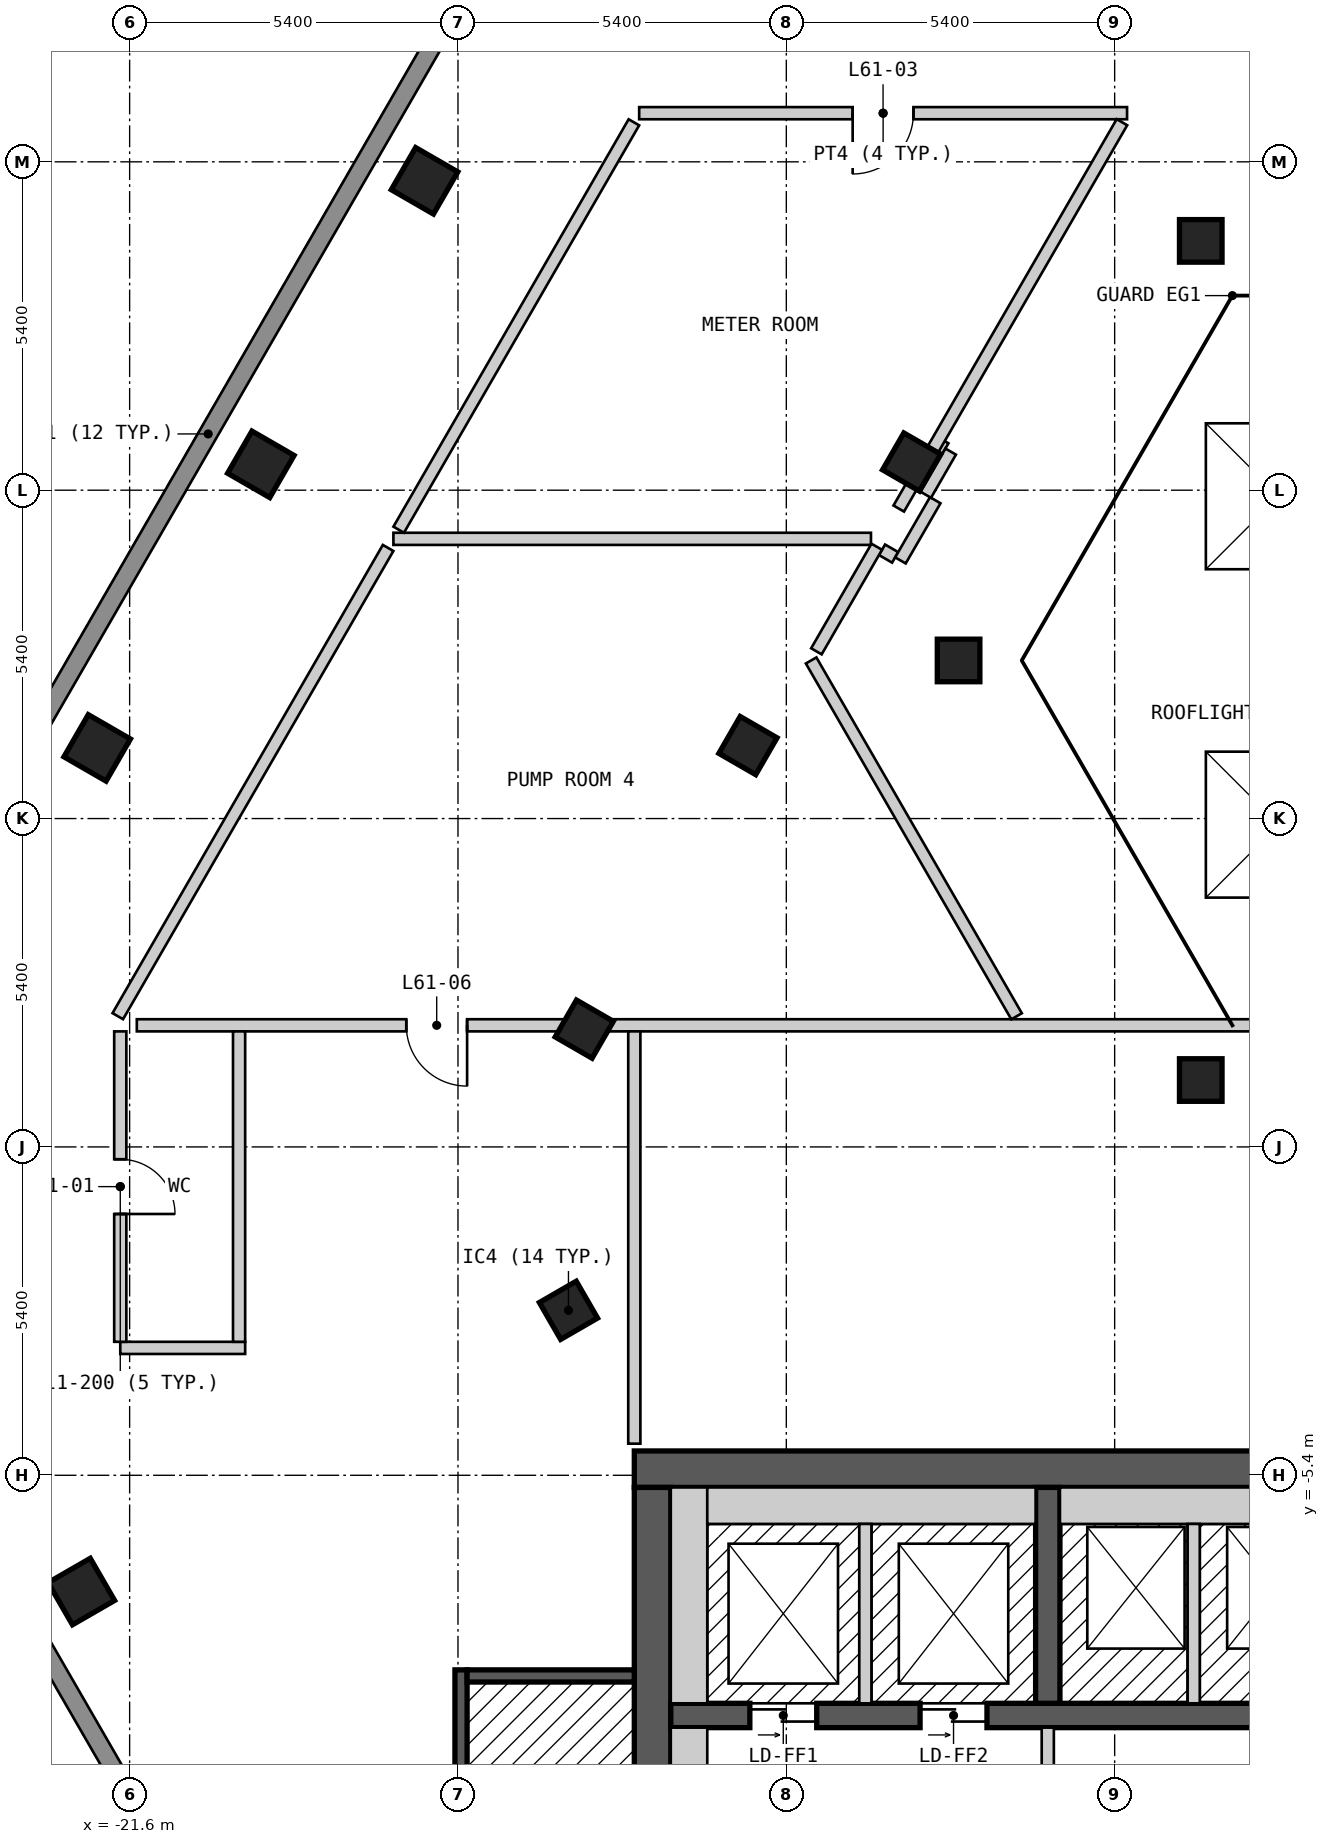
"""IFC4 building model, lengths in metres.
Left out: names, types, materials, properties, quantities, classifications, styles, units other than length and angle.
Written with IfcOpenShell. Run it as: python <this file> out.ifc"""

import sys

from ifc_helpers import new_model, si_unit, direction, frame, frame_2d, origin, origin_2d, place, context, subcontext, project, spatial, polyline, rectangle, outline, extrude, element, fill, save


model = new_model("IFC4")
c1 = context("Model", 3, precision=1e-05, world=origin(), true_north=direction((0.0, 1.0)))
c2 = subcontext(c1, "Body", "Model", "MODEL_VIEW")
j1 = project(units=[si_unit("LENGTHUNIT", "METRE"), si_unit("PLANEANGLEUNIT", "RADIAN")], contexts=[c1])
p1 = place(None, origin())
s1 = spatial("IfcSite", under=j1, at=p1, CompositionType="ELEMENT")
p2 = place(p1, origin())
s2 = spatial("IfcBuilding", under=s1, at=p2, CompositionType="ELEMENT")
p3 = place(p2, frame((0.0, 0.0, 199.2)))
s3 = spatial("IfcBuildingStorey", under=s2, at=p3, CompositionType="ELEMENT", Elevation=199.2)
for number, where, z_axis, x_axis in (
    (1, (-16.75, 15.888, 0.0), (0.0, 0.0, 1.0), (-0.5, -0.866, 0.0)),
    (2, (-19.442, 11.225, 0.0), (0.0, 0.0, 1.0), (-0.5, -0.866, 0.0)),
    (3, (-22.134, 6.562, 0.0), (0.0, 0.0, 1.0), (-0.5, -0.866, 0.0)),
    (4, (-22.394, -7.312, 0.0), (0.0, 0.0, 1.0), (0.5, -0.866, 0.0)),
):
    element("IfcColumn", number, at=place(p3, frame(where, z_axis=z_axis, x_axis=x_axis)), inside=s3, PredefinedType="COLUMN", context=c2, shape_type="SweptSolid", body=[
        extrude(rectangle(XDim=0.8, YDim=0.8, at=origin_2d()), origin(), (0.0, 0.0, 1.0), 3.6),
    ])
for number, where, z_axis, x_axis in (
    (5, (-14.383, -2.687, 0.0), (0.0, 0.0, 1.0), (0.5, -0.866, 0.0)),
    (6, (-3.984, 14.9, 0.0), (0.0, 0.0, 1.0), (1.0, 0.0, 0.0)),
    (7, (-8.739, 11.263, 0.0), (0.0, 0.0, 1.0), (-0.5, -0.866, 0.0)),
    (8, (-7.967, 8.0, 0.0), (0.0, 0.0, 1.0), (1.0, 0.0, 0.0)),
    (9, (-11.431, 6.6, 0.0), (0.0, 0.0, 1.0), (-0.5, -0.866, 0.0)),
    (10, (-3.984, 1.1, 0.0), (0.0, 0.0, 1.0), (1.0, 0.0, 0.0)),
    (11, (-14.123, 1.937, 0.0), (0.0, 0.0, 1.0), (-0.5, -0.866, 0.0)),
):
    element("IfcColumn", number, at=place(p3, frame(where, z_axis=z_axis, x_axis=x_axis)), inside=s3, PredefinedType="COLUMN", context=c2, shape_type="SweptSolid", body=[
        extrude(rectangle(XDim=0.7, YDim=0.7, at=origin_2d()), origin(), (0.0, 0.0, 1.0), 3.6),
    ])
p4 = place(p3, frame((-13.3, -5.3, 0.0), z_axis=(0.0, 0.0, 1.0), x_axis=(1.0, 0.0, 0.0)))
e12 = element("IfcWall", 12, at=p4, inside=s3, PredefinedType="SHEAR", context=c2, shape_type="SweptSolid", body=[
    extrude(rectangle(XDim=26.6, YDim=0.6, at=frame_2d((13.3, 0.0))), origin(), (0.0, 0.0, 1.0), 2.6),
])
p5 = place(p4, frame((23.65, 0.0, 0.0)))
e13 = element("IfcOpeningElement", 13, at=p5, cuts=e12, PredefinedType="OPENING", context=c2, shape_type="SweptSolid", body=[
    extrude(rectangle(XDim=1.2, YDim=2.1, at=frame_2d((0.6, 1.05))), frame((0.0, 0.31, 0.0), z_axis=(0.0, -1.0, 0.0), x_axis=(1.0, 0.0, 0.0)), (0.0, 0.0, 1.0), 0.62),
])
p6 = place(p3, frame((-13.0, -18.4, 0.0), z_axis=(0.0, 0.0, 1.0), x_axis=(0.0, 1.0, 0.0)))
e14 = element("IfcWall", 14, at=p6, inside=s3, PredefinedType="SHEAR", context=c2, shape_type="SweptSolid", body=[
    extrude(rectangle(XDim=12.8, YDim=0.6, at=frame_2d((6.4, 0.0))), origin(), (0.0, 0.0, 1.0), 2.6),
])
p7 = place(p6, frame((4.2, 0.0, 0.0)))
e15 = element("IfcOpeningElement", 15, at=p7, cuts=e14, PredefinedType="OPENING", context=c2, shape_type="SweptSolid", body=[
    extrude(rectangle(XDim=1.2, YDim=2.1, at=frame_2d((0.6, 1.05))), frame((0.0, 0.31, 0.0), z_axis=(0.0, -1.0, 0.0), x_axis=(1.0, 0.0, 0.0)), (0.0, 0.0, 1.0), 0.62),
])
p8 = place(p3, frame((-12.7, -9.35, 0.0), z_axis=(0.0, 0.0, 1.0), x_axis=(1.0, 0.0, 0.0)))
e16 = element("IfcWall", 16, at=p8, inside=s3, PredefinedType="SHEAR", context=c2, shape_type="SweptSolid", body=[
    extrude(rectangle(XDim=22.9, YDim=0.4, at=frame_2d((11.45, 0.0))), origin(), (0.0, 0.0, 1.0), 2.6),
])
p9 = place(p8, frame((1.3, 0.0, 0.0)))
e17 = element("IfcOpeningElement", 17, at=p9, cuts=e16, PredefinedType="OPENING", context=c2, shape_type="SweptSolid", body=[
    extrude(rectangle(XDim=1.1, YDim=2.1, at=frame_2d((0.55, 1.05))), frame((0.0, 0.21, 0.0), z_axis=(0.0, -1.0, 0.0), x_axis=(1.0, 0.0, 0.0)), (0.0, 0.0, 1.0), 0.42),
])
p10 = place(p8, frame((4.1, 0.0, 0.0)))
e18 = element("IfcOpeningElement", 18, at=p10, cuts=e16, PredefinedType="OPENING", context=c2, shape_type="SweptSolid", body=[
    extrude(rectangle(XDim=1.1, YDim=2.1, at=frame_2d((0.55, 1.05))), frame((0.0, 0.21, 0.0), z_axis=(0.0, -1.0, 0.0), x_axis=(1.0, 0.0, 0.0)), (0.0, 0.0, 1.0), 0.42),
])
p11 = place(p8, frame((20.8, 0.0, 0.0)))
e19 = element("IfcOpeningElement", 19, at=p11, cuts=e16, PredefinedType="OPENING", context=c2, shape_type="SweptSolid", body=[
    extrude(rectangle(XDim=1.1, YDim=2.1, at=frame_2d((0.55, 1.05))), frame((0.0, 0.21, 0.0), z_axis=(0.0, -1.0, 0.0), x_axis=(1.0, 0.0, 0.0)), (0.0, 0.0, 1.0), 0.42),
])
p12 = place(p3, frame((-6.5, -9.15, 0.0), z_axis=(0.0, 0.0, 1.0), x_axis=(0.0, 1.0, 0.0)))
e20 = element("IfcWall", 20, at=p12, inside=s3, PredefinedType="SHEAR", context=c2, shape_type="SweptSolid", body=[
    extrude(rectangle(XDim=3.55, YDim=0.4, at=frame_2d((1.775, 0.0))), origin(), (0.0, 0.0, 1.0), 2.6),
])
p13 = place(p3, frame((-14.592, 21.625, 0.0), z_axis=(0.0, 0.0, 1.0), x_axis=(-0.500010537973, -0.866019319597, 0.0)))
e21 = element("IfcWall", 21, at=p13, inside=s3, PredefinedType="SOLIDWALL", context=c2, shape_type="SweptSolid", body=[
    extrude(outline(polyline([(0.0, -0.15), (22.863, -0.15), (22.783, 0.15), (0.08, 0.15), (0.0, -0.15)])), origin(), (0.0, 0.0, 1.0), 2.6),
])
p14 = place(p3, frame((-26.024, -3.025, 0.0), z_axis=(0.0, 0.0, 1.0), x_axis=(0.500018670445, -0.86601462413, 0.0)))
e22 = element("IfcWall", 22, at=p14, inside=s3, PredefinedType="SOLIDWALL", context=c2, shape_type="SweptSolid", body=[
    extrude(outline(polyline([(0.0, -0.15), (20.785, -0.15), (20.705, 0.15), (0.08, 0.15), (0.0, -0.15)])), origin(), (0.0, 0.0, 1.0), 2.6),
])
p15 = place(p3, frame((-21.754, -3.305, 0.0), z_axis=(0.0, 0.0, 1.0), x_axis=(1.0, 0.0, 0.0)))
e23 = element("IfcWall", 23, at=p15, inside=s3, PredefinedType="PARTITIONING", context=c2, shape_type="SweptSolid", body=[
    extrude(rectangle(XDim=2.054, YDim=0.2, at=frame_2d((1.027, 0.0))), origin(), (0.0, 0.0, 1.0), 2.6),
])
p16 = place(p3, frame((-21.482, 2.0, 0.0), z_axis=(0.0, 0.0, 1.0), x_axis=(1.0, 0.0, 0.0)))
e24 = element("IfcWall", 24, at=p16, inside=s3, PredefinedType="SOLIDWALL", context=c2, shape_type="SweptSolid", body=[
    extrude(rectangle(XDim=42.564, YDim=0.2, at=frame_2d((21.282, 0.0))), origin(), (0.0, 0.0, 1.0), 2.6),
])
p17 = place(p16, frame((4.432, 0.0, 0.0)))
e25 = element("IfcOpeningElement", 25, at=p17, cuts=e24, PredefinedType="OPENING", context=c2, shape_type="SweptSolid", body=[
    extrude(rectangle(XDim=1.0, YDim=2.1, at=frame_2d((0.5, 1.05))), frame((0.0, 0.11, 0.0), z_axis=(0.0, -1.0, 0.0), x_axis=(1.0, 0.0, 0.0)), (0.0, 0.0, 1.0), 0.22),
])
p18 = place(p16, frame((25.972, 0.0, 0.0)))
e26 = element("IfcOpeningElement", 26, at=p18, cuts=e24, PredefinedType="OPENING", context=c2, shape_type="SweptSolid", body=[
    extrude(rectangle(XDim=1.8, YDim=2.1, at=frame_2d((0.9, 1.05))), frame((0.0, 0.11, 0.0), z_axis=(0.0, -1.0, 0.0), x_axis=(1.0, 0.0, 0.0)), (0.0, 0.0, 1.0), 0.22),
])
p19 = place(p3, frame((-17.262, 10.0, 0.0), z_axis=(0.0, 0.0, 1.0), x_axis=(1.0, 0.0, 0.0)))
e27 = element("IfcWall", 27, at=p19, inside=s3, PredefinedType="SOLIDWALL", context=c2, shape_type="SweptSolid", body=[
    extrude(rectangle(XDim=7.854, YDim=0.2, at=frame_2d((3.927, 0.0))), origin(), (0.0, 0.0, 1.0), 2.6),
])
p20 = place(p3, frame((-13.22, 17.0, 0.0), z_axis=(0.0, 0.0, 1.0), x_axis=(1.0, 0.0, 0.0)))
e28 = element("IfcWall", 28, at=p20, inside=s3, PredefinedType="PARTITIONING", context=c2, shape_type="SweptSolid", body=[
    extrude(rectangle(XDim=8.024, YDim=0.2, at=frame_2d((4.012, 0.0))), origin(), (0.0, 0.0, 1.0), 2.6),
])
p21 = place(p20, frame((4.511, 0.0, 0.0), z_axis=(0.0, 0.0, 1.0), x_axis=(-1.0, 0.0, 0.0)))
e29 = element("IfcOpeningElement", 29, at=p21, cuts=e28, PredefinedType="OPENING", context=c2, shape_type="SweptSolid", body=[
    extrude(rectangle(XDim=1.0, YDim=2.1, at=frame_2d((0.5, 1.05))), frame((0.0, 0.11, 0.0), z_axis=(0.0, -1.0, 0.0), x_axis=(1.0, 0.0, 0.0)), (0.0, 0.0, 1.0), 0.22),
])
p22 = place(p3, frame((-21.754, -3.205, 0.0), z_axis=(0.0, 0.0, 1.0), x_axis=(0.0, 1.0, 0.0)))
e30 = element("IfcWall", 30, at=p22, inside=s3, PredefinedType="PARTITIONING", context=c2, shape_type="SweptSolid", body=[
    extrude(rectangle(XDim=5.105, YDim=0.2, at=frame_2d((2.552, 0.0))), origin(), (0.0, 0.0, 1.0), 2.6),
])
p23 = place(p22, frame((3.002, 0.0, 0.0), z_axis=(0.0, 0.0, 1.0), x_axis=(-1.0, 0.0, 0.0)))
e31 = element("IfcOpeningElement", 31, at=p23, cuts=e30, PredefinedType="OPENING", context=c2, shape_type="SweptSolid", body=[
    extrude(rectangle(XDim=0.9, YDim=2.1, at=frame_2d((0.45, 1.05))), frame((0.0, 0.11, 0.0), z_axis=(0.0, -1.0, 0.0), x_axis=(1.0, 0.0, 0.0)), (0.0, 0.0, 1.0), 0.22),
])
p24 = place(p3, frame((-19.8, -3.205, 0.0), z_axis=(0.0, 0.0, 1.0), x_axis=(0.0, 1.0, 0.0)))
e32 = element("IfcWall", 32, at=p24, inside=s3, PredefinedType="PARTITIONING", context=c2, shape_type="SweptSolid", body=[
    extrude(rectangle(XDim=5.105, YDim=0.2, at=frame_2d((2.552, 0.0))), origin(), (0.0, 0.0, 1.0), 2.6),
])
p25 = place(p3, frame((-13.3, -4.88, 0.0), z_axis=(0.0, 0.0, 1.0), x_axis=(0.0, 1.0, 0.0)))
e33 = element("IfcWall", 33, at=p25, inside=s3, PredefinedType="PARTITIONING", context=c2, shape_type="SweptSolid", body=[
    extrude(rectangle(XDim=6.78, YDim=0.2, at=frame_2d((3.39, 0.0))), origin(), (0.0, 0.0, 1.0), 2.6),
])
p26 = place(p3, frame((-9.226, 9.82, 0.0), z_axis=(0.0, 0.0, 1.0), x_axis=(0.86558248939, -0.500766366743, 0.0)))
e34 = element("IfcWall", 34, at=p26, inside=s3, PredefinedType="SOLIDWALL", context=c2, shape_type="SweptSolid", body=[
    extrude(rectangle(XDim=0.25, YDim=0.2, at=frame_2d((0.125, 0.0))), origin(), (0.0, 0.0, 1.0), 2.6),
])
p27 = place(p3, frame((-8.287, 11.545, 0.0), z_axis=(0.0, 0.0, 1.0), x_axis=(0.864817651778, -0.502086077454, 0.0)))
e35 = element("IfcWall", 35, at=p27, inside=s3, PredefinedType="SOLIDWALL", context=c2, shape_type="SweptSolid", body=[
    extrude(rectangle(XDim=0.119, YDim=0.2, at=frame_2d((0.06, 0.0))), origin(), (0.0, 0.0, 1.0), 2.6),
])
p28 = place(p3, frame((-10.392, 8.0, 0.0), z_axis=(0.0, 0.0, 1.0), x_axis=(0.500051862572, -0.865995458844, 0.0)))
e36 = element("IfcWall", 36, at=p28, inside=s3, PredefinedType="SOLIDWALL", context=c2, shape_type="SweptSolid", body=[
    extrude(rectangle(XDim=6.758, YDim=0.2, at=frame_2d((3.379, 0.0))), origin(), (0.0, 0.0, 1.0), 2.6),
])
p29 = place(p3, frame((-8.923, 9.645, 0.0), z_axis=(0.0, 0.0, 1.0), x_axis=(0.500295385156, 0.865854795905, 0.0)))
e37 = element("IfcWall", 37, at=p29, inside=s3, PredefinedType="SOLIDWALL", context=c2, shape_type="SweptSolid", body=[
    extrude(rectangle(XDim=1.143, YDim=0.2, at=frame_2d((0.572, 0.0))), origin(), (0.0, 0.0, 1.0), 2.6),
])
p30 = place(p3, frame((-8.507, 10.725, 0.0), z_axis=(0.0, 0.0, 1.0), x_axis=(0.500237910626, 0.865888002441, 0.0)))
e38 = element("IfcWall", 38, at=p30, inside=s3, PredefinedType="SOLIDWALL", context=c2, shape_type="SweptSolid", body=[
    extrude(rectangle(XDim=0.82, YDim=0.2, at=frame_2d((0.41, 0.0))), origin(), (0.0, 0.0, 1.0), 2.6),
])
p31 = place(p3, frame((-10.305, 8.15, 0.0), z_axis=(0.0, 0.0, 1.0), x_axis=(0.499537951842, 0.86629200312, 0.0)))
e39 = element("IfcWall", 39, at=p31, inside=s3, PredefinedType="SOLIDWALL", context=c2, shape_type="SweptSolid", body=[
    extrude(rectangle(XDim=1.986, YDim=0.2, at=frame_2d((0.993, 0.0))), origin(), (0.0, 0.0, 1.0), 2.6),
])
p32 = place(p3, frame((-8.951, 10.498, 0.0), z_axis=(0.0, 0.0, 1.0), x_axis=(0.500246557122, 0.86588300716, 0.0)))
e40 = element("IfcWall", 40, at=p32, inside=s3, PredefinedType="SOLIDWALL", context=c2, shape_type="SweptSolid", body=[
    extrude(rectangle(XDim=7.338, YDim=0.2, at=frame_2d((3.669, 0.0))), origin(), (0.0, 0.0, 1.0), 2.6),
])
p33 = place(p3, frame((-21.795, 2.15, 0.0), z_axis=(0.0, 0.0, 1.0), x_axis=(0.500007671222, 0.866020974757, 0.0)))
e41 = element("IfcWall", 41, at=p33, inside=s3, PredefinedType="SOLIDWALL", context=c2, shape_type="SweptSolid", body=[
    extrude(rectangle(XDim=8.891, YDim=0.2, at=frame_2d((4.446, 0.0))), origin(), (0.0, 0.0, 1.0), 2.6),
])
p34 = place(p3, frame((-17.175, 10.15, 0.0), z_axis=(0.0, 0.0, 1.0), x_axis=(0.499981047344, 0.866036345829, 0.0)))
e42 = element("IfcWall", 42, at=p34, inside=s3, PredefinedType="PARTITIONING", context=c2, shape_type="SweptSolid", body=[
    extrude(rectangle(XDim=7.737, YDim=0.2, at=frame_2d((3.868, 0.0))), origin(), (0.0, 0.0, 1.0), 2.6),
])
p35 = place(p3, frame((-16.15, -14.4, 0.0), z_axis=(0.0, 0.0, 1.0), x_axis=(0.0, 1.0, 0.0)))
e43 = element("IfcWall", 43, at=p35, inside=s3, PredefinedType="SOLIDWALL", context=c2, shape_type="SweptSolid", body=[
    extrude(rectangle(XDim=5.8, YDim=0.2, at=frame_2d((2.9, 0.0))), origin(), (0.0, 0.0, 1.0), 2.6),
])
p36 = place(p3, frame((-16.05, -8.7, 0.0), z_axis=(0.0, 0.0, 1.0), x_axis=(1.0, 0.0, 0.0)))
e44 = element("IfcWall", 44, at=p36, inside=s3, PredefinedType="SOLIDWALL", context=c2, shape_type="SweptSolid", body=[
    extrude(rectangle(XDim=2.75, YDim=0.2, at=frame_2d((1.375, 0.0))), origin(), (0.0, 0.0, 1.0), 2.6),
])
p37 = place(p3, frame((-12.4, -13.0, 0.0), z_axis=(0.0, 0.0, 1.0), x_axis=(0.0, 1.0, 0.0)))
e45 = element("IfcWall", 45, at=p37, inside=s3, PredefinedType="PARTITIONING", context=c2, shape_type="SweptSolid", body=[
    extrude(rectangle(XDim=3.45, YDim=0.6, at=frame_2d((1.725, 0.0))), origin(), (0.0, 0.0, 1.0), 2.6),
])
p38 = place(p3, frame((-12.4, -9.15, 0.0), z_axis=(0.0, 0.0, 1.0), x_axis=(0.0, 1.0, 0.0)))
e46 = element("IfcWall", 46, at=p38, inside=s3, PredefinedType="SOLIDWALL", context=c2, shape_type="SweptSolid", body=[
    extrude(rectangle(XDim=3.55, YDim=0.6, at=frame_2d((1.775, 0.0))), origin(), (0.0, 0.0, 1.0), 2.6),
])
p39 = place(p3, frame((-12.1, -5.9, 0.0), z_axis=(0.0, 0.0, 1.0), x_axis=(1.0, 0.0, 0.0)))
e47 = element("IfcWall", 47, at=p39, inside=s3, PredefinedType="SOLIDWALL", context=c2, shape_type="SweptSolid", body=[
    extrude(rectangle(XDim=5.4, YDim=0.6, at=frame_2d((2.7, 0.0))), origin(), (0.0, 0.0, 1.0), 2.6),
])
p40 = place(p3, frame((-9.5, -9.15, 0.0), z_axis=(0.0, 0.0, 1.0), x_axis=(0.0, 1.0, 0.0)))
e48 = element("IfcWall", 48, at=p40, inside=s3, PredefinedType="SOLIDWALL", context=c2, shape_type="SweptSolid", body=[
    extrude(rectangle(XDim=2.95, YDim=0.2, at=frame_2d((1.475, 0.0))), origin(), (0.0, 0.0, 1.0), 2.6),
])
p41 = place(p3, frame((-6.5, -14.45, 0.0), z_axis=(0.0, 0.0, 1.0), x_axis=(0.0, 1.0, 0.0)))
e49 = element("IfcWall", 49, at=p41, inside=s3, PredefinedType="PARTITIONING", context=c2, shape_type="SweptSolid", body=[
    extrude(rectangle(XDim=4.9, YDim=0.2, at=frame_2d((2.45, 0.0))), origin(), (0.0, 0.0, 1.0), 2.6),
])
p42 = place(p41, frame((3.15, 0.0, 0.0), z_axis=(0.0, 0.0, 1.0), x_axis=(-1.0, 0.0, 0.0)))
e50 = element("IfcOpeningElement", 50, at=p42, cuts=e49, PredefinedType="OPENING", context=c2, shape_type="SweptSolid", body=[
    extrude(rectangle(XDim=1.4, YDim=2.1, at=frame_2d((0.7, 1.05))), frame((0.0, 0.11, 0.0), z_axis=(0.0, -1.0, 0.0), x_axis=(1.0, 0.0, 0.0)), (0.0, 0.0, 1.0), 0.22),
])
p43 = place(p3, frame((-6.3, -5.9, 0.0), z_axis=(0.0, 0.0, 1.0), x_axis=(1.0, 0.0, 0.0)))
e51 = element("IfcWall", 51, at=p43, inside=s3, PredefinedType="SOLIDWALL", context=c2, shape_type="SweptSolid", body=[
    extrude(rectangle(XDim=16.1, YDim=0.6, at=frame_2d((8.05, 0.0))), origin(), (0.0, 0.0, 1.0), 2.6),
])
p44 = place(p3, frame((-4.1, -9.15, 0.0), z_axis=(0.0, 0.0, 1.0), x_axis=(0.0, 1.0, 0.0)))
e52 = element("IfcWall", 52, at=p44, inside=s3, PredefinedType="SOLIDWALL", context=c2, shape_type="SweptSolid", body=[
    extrude(rectangle(XDim=2.95, YDim=0.2, at=frame_2d((1.475, 0.0))), origin(), (0.0, 0.0, 1.0), 2.6),
])
p45 = place(p3, frame((0.0, 0.0, -0.4)))
p46 = place(p45, frame((-2.7, 5.3, 0.0)))
p47 = place(p46, frame((0.0, 0.0, 0.35)))
e53 = element("IfcWindow", 53, at=p47, inside=s3, PartitioningType="SINGLE_PANEL", PredefinedType="SKYLIGHT", context=c2, shape_type="SweptSolid", body=[
    extrude(rectangle(XDim=2.4, YDim=2.4, at=origin_2d()), origin(), (0.0, 0.0, 1.0), 0.05),
])
p48 = place(p45, frame((-2.7, 10.7, 0.0)))
p49 = place(p48, frame((0.0, 0.0, 0.35)))
e54 = element("IfcWindow", 54, at=p49, inside=s3, PartitioningType="SINGLE_PANEL", PredefinedType="SKYLIGHT", context=c2, shape_type="SweptSolid", body=[
    extrude(rectangle(XDim=2.4, YDim=2.4, at=origin_2d()), origin(), (0.0, 0.0, 1.0), 0.05),
])
p50 = place(p23, origin())
e55 = element("IfcDoor", 55, at=p50, inside=s3, OperationType="SINGLE_SWING_RIGHT", PredefinedType="DOOR", context=c2, shape_type="SweptSolid", body=[
    extrude(rectangle(XDim=0.9, YDim=2.1, at=frame_2d((0.45, 1.05))), frame((0.0, 0.025, 0.0), z_axis=(0.0, -1.0, 0.0), x_axis=(1.0, 0.0, 0.0)), (0.0, 0.0, 1.0), 0.05),
])
fill(e31, e55)
p51 = place(p21, origin())
e56 = element("IfcDoor", 56, at=p51, inside=s3, OperationType="SINGLE_SWING_RIGHT", PredefinedType="DOOR", context=c2, shape_type="SweptSolid", body=[
    extrude(rectangle(XDim=1.0, YDim=2.1, at=frame_2d((0.5, 1.05))), frame((0.0, 0.025, 0.0), z_axis=(0.0, -1.0, 0.0), x_axis=(1.0, 0.0, 0.0)), (0.0, 0.0, 1.0), 0.05),
])
fill(e29, e56)
p52 = place(p17, origin())
e57 = element("IfcDoor", 57, at=p52, inside=s3, OperationType="SINGLE_SWING_RIGHT", PredefinedType="DOOR", context=c2, shape_type="SweptSolid", body=[
    extrude(rectangle(XDim=1.0, YDim=2.1, at=frame_2d((0.5, 1.05))), frame((0.0, 0.025, 0.0), z_axis=(0.0, -1.0, 0.0), x_axis=(1.0, 0.0, 0.0)), (0.0, 0.0, 1.0), 0.05),
])
fill(e25, e57)
p53 = place(p9, origin())
e58 = element("IfcDoor", 58, at=p53, inside=s3, OperationType="DOUBLE_DOOR_SLIDING", PredefinedType="DOOR", context=c2, shape_type="SweptSolid", body=[
    extrude(rectangle(XDim=1.1, YDim=2.1, at=frame_2d((0.55, 1.05))), frame((0.0, 0.025, 0.0), z_axis=(0.0, -1.0, 0.0), x_axis=(1.0, 0.0, 0.0)), (0.0, 0.0, 1.0), 0.05),
])
fill(e17, e58)
p54 = place(p10, origin())
e59 = element("IfcDoor", 59, at=p54, inside=s3, OperationType="DOUBLE_DOOR_SLIDING", PredefinedType="DOOR", context=c2, shape_type="SweptSolid", body=[
    extrude(rectangle(XDim=1.1, YDim=2.1, at=frame_2d((0.55, 1.05))), frame((0.0, 0.025, 0.0), z_axis=(0.0, -1.0, 0.0), x_axis=(1.0, 0.0, 0.0)), (0.0, 0.0, 1.0), 0.05),
])
fill(e18, e59)
save(model, sys.argv[1])
